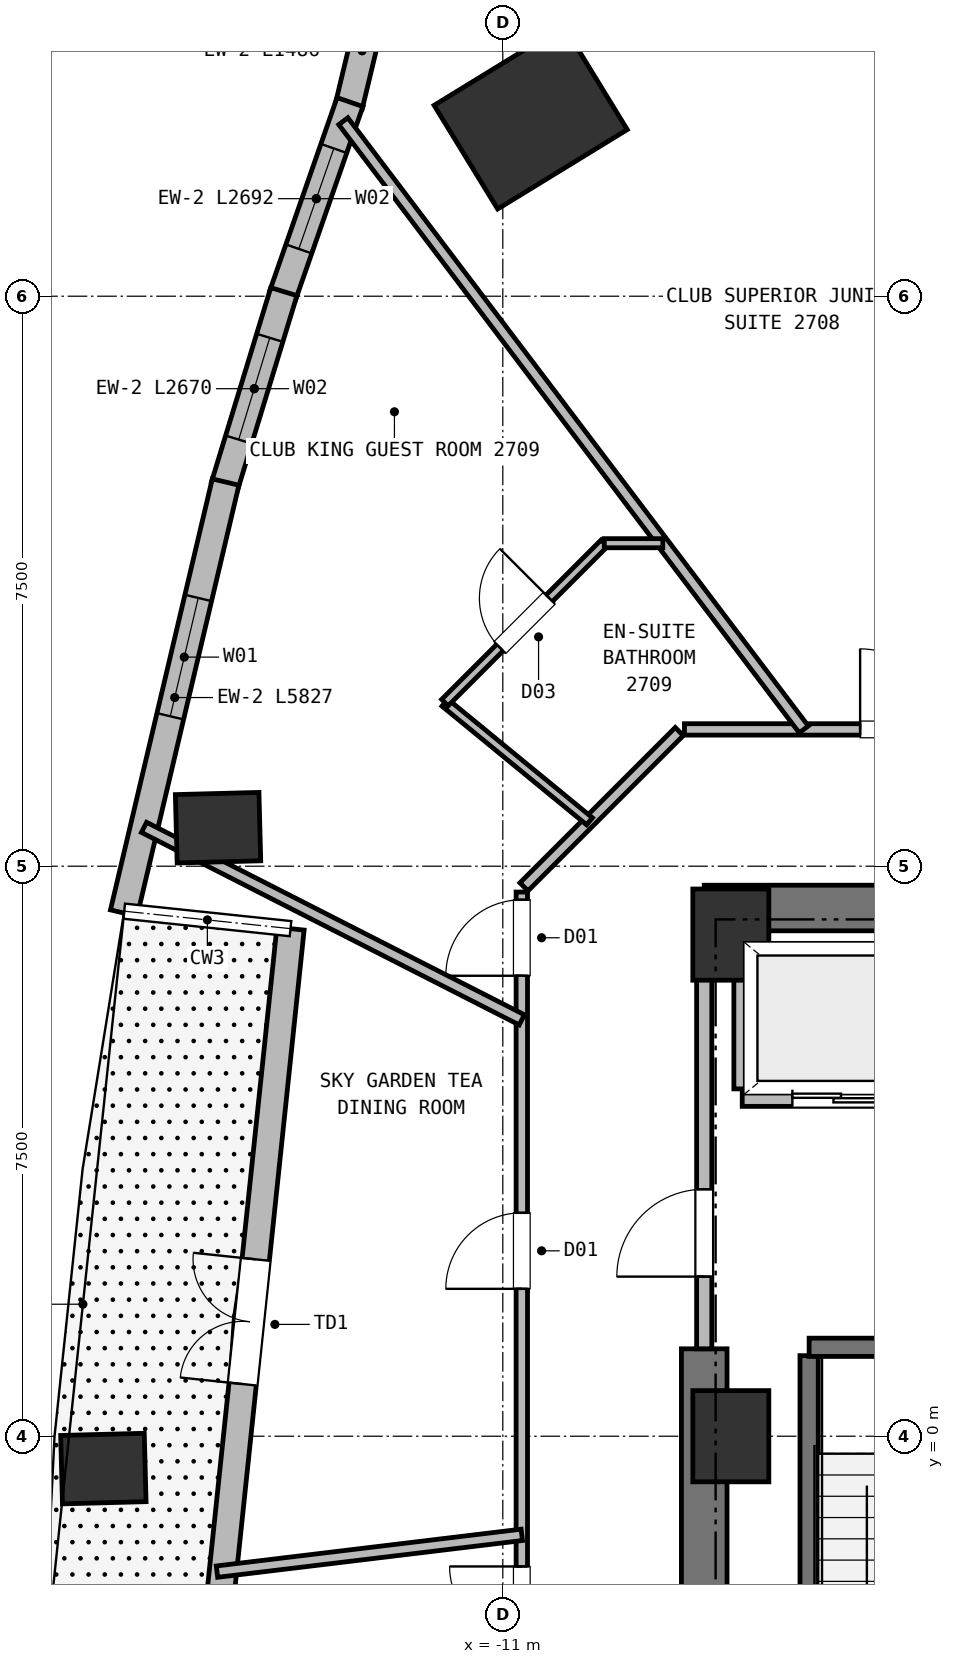
"""IFC4 building model, lengths in metres.
Left out: names, types, materials, properties, quantities, classifications, styles, units other than length and angle.
Written with IfcOpenShell. Run it as: python <this file> out.ifc"""

import sys

from ifc_helpers import new_model, si_unit, direction, frame, frame_2d, origin, origin_2d, place, context, subcontext, project, spatial, rectangle, extrude, element, fill, save


model = new_model("IFC4")
c1 = context("Model", 3, precision=1e-05, world=origin(), true_north=direction((0.0, 1.0)))
c2 = subcontext(c1, "Body", "Model", "MODEL_VIEW")
j1 = project(units=[si_unit("LENGTHUNIT", "METRE"), si_unit("PLANEANGLEUNIT", "RADIAN")], contexts=[c1])
p1 = place(None, origin())
s1 = spatial("IfcSite", under=j1, at=p1, CompositionType="ELEMENT")
p2 = place(p1, origin())
s2 = spatial("IfcBuilding", under=s1, at=p2, CompositionType="ELEMENT")
p3 = place(p2, frame((0.0, 0.0, 101.0)))
s3 = spatial("IfcBuildingStorey", under=s2, at=p3, CompositionType="ELEMENT", Elevation=101.0)
for number, where, z_axis, x_axis in (
    (1, (-8.0, 6.6, 0.0), (0.0, 0.0, 1.0), (1.0, 0.0, 0.0)),
    (2, (-8.0, 0.0, 0.0), (0.0, 0.0, 1.0), (1.0, 0.0, 0.0)),
):
    element("IfcColumn", number, at=place(p3, frame(where, z_axis=z_axis, x_axis=x_axis)), inside=s3, PredefinedType="COLUMN", context=c2, shape_type="SweptSolid", body=[
        extrude(rectangle(XDim=1.0, YDim=1.2, at=origin_2d()), origin(), (0.0, 0.0, 1.0), 3.75),
    ])
p4 = place(p3, frame((-8.35, 6.95, 0.0), z_axis=(0.0, 0.0, 1.0), x_axis=(1.0, 0.0, 0.0)))
e3 = element("IfcWall", 3, at=p4, inside=s3, PredefinedType="SHEAR", context=c2, shape_type="SweptSolid", body=[
    extrude(rectangle(XDim=16.7, YDim=0.6, at=frame_2d((8.35, 0.0))), origin(), (0.0, 0.0, 1.0), 3.5),
])
p5 = place(p3, frame((-8.35, -6.95, 0.0), z_axis=(0.0, 0.0, 1.0), x_axis=(0.0, 1.0, 0.0)))
e4 = element("IfcWall", 4, at=p5, inside=s3, PredefinedType="SHEAR", context=c2, shape_type="SweptSolid", body=[
    extrude(rectangle(XDim=8.1, YDim=0.6, at=frame_2d((4.05, 0.0))), origin(), (0.0, 0.0, 1.0), 3.5),
])
p6 = place(p3, frame((-10.633, 17.352, 0.0), z_axis=(0.0, 0.0, 1.0), x_axis=(-0.522498564716, 0.852640164354, 0.0)))
e5 = element("IfcColumn", 5, at=p6, inside=s3, PredefinedType="COLUMN", context=c2, shape_type="SweptSolid", body=[
    extrude(rectangle(XDim=1.6, YDim=2.0, at=origin_2d()), origin(), (0.0, 0.0, 1.0), 3.75),
])
for number, where, z_axis, x_axis in (
    (6, (-14.747, 8.007, 0.0), (0.0, 0.0, 1.0), (-0.026, 1.0, 0.0)),
    (7, (-16.255, -0.426, 0.0), (0.0, 0.0, 1.0), (-0.026, 1.0, 0.0)),
):
    element("IfcColumn", number, at=place(p3, frame(where, z_axis=z_axis, x_axis=x_axis)), inside=s3, PredefinedType="COLUMN", context=c2, shape_type="SweptSolid", body=[
        extrude(rectangle(XDim=0.9, YDim=1.1, at=origin_2d()), origin(), (0.0, 0.0, 1.0), 3.75),
    ])
p7 = place(p3, frame((-14.88, -3.665, 0.0), z_axis=(0.0, 0.0, 1.0), x_axis=(0.104508820017, 0.994523959761, 0.0)))
e8 = element("IfcWall", 8, at=p7, inside=s3, PredefinedType="SOLIDWALL", context=c2, shape_type="SweptSolid", body=[
    extrude(rectangle(XDim=10.4, YDim=0.36, at=frame_2d((5.2, 0.0))), origin(), (0.0, 0.0, 1.0), 3.5),
])
p8 = place(p7, frame((4.375, 0.0, 0.0)))
e9 = element("IfcOpeningElement", 9, at=p8, cuts=e8, PredefinedType="OPENING", context=c2, shape_type="SweptSolid", body=[
    extrude(rectangle(XDim=1.65, YDim=2.25, at=frame_2d((0.825, 1.125))), frame((0.0, 0.19, 0.0), z_axis=(0.0, -1.0, 0.0), x_axis=(1.0, 0.0, 0.0)), (0.0, 0.0, 1.0), 0.38),
])
p9 = place(p3, frame((-13.025, 17.506, 0.0), z_axis=(0.0, 0.0, 1.0), x_axis=(0.23351590147, 0.972352983109, 0.0)))
e10 = element("IfcWall", 10, at=p9, inside=s3, PredefinedType="SOLIDWALL", context=c2, shape_type="SweptSolid", body=[
    extrude(rectangle(XDim=1.486, YDim=0.36, at=frame_2d((0.743, 0.0))), origin(), (0.0, 0.0, 1.0), 3.5),
])
p10 = place(p3, frame((-13.896, 15.012, 0.0), z_axis=(0.0, 0.0, 1.0), x_axis=(0.328988489893, 0.944333931148, 0.0)))
e11 = element("IfcWall", 11, at=p10, inside=s3, PredefinedType="SOLIDWALL", context=c2, shape_type="SweptSolid", body=[
    extrude(rectangle(XDim=2.692, YDim=0.36, at=frame_2d((1.346, 0.0))), origin(), (0.0, 0.0, 1.0), 3.5),
])
p11 = place(p10, frame((0.646, 0.0, 0.72)))
e12 = element("IfcOpeningElement", 12, at=p11, cuts=e11, PredefinedType="OPENING", context=c2, shape_type="SweptSolid", body=[
    extrude(rectangle(XDim=1.4, YDim=1.84, at=frame_2d((0.7, 0.92))), frame((0.0, 0.19, 0.0), z_axis=(0.0, -1.0, 0.0), x_axis=(1.0, 0.0, 0.0)), (0.0, 0.0, 1.0), 0.38),
])
p12 = place(p3, frame((-14.66, 12.507, 0.0), z_axis=(0.0, 0.0, 1.0), x_axis=(0.291842096338, 0.956466513164, 0.0)))
e13 = element("IfcWall", 13, at=p12, inside=s3, PredefinedType="SOLIDWALL", context=c2, shape_type="SweptSolid", body=[
    extrude(rectangle(XDim=2.669, YDim=0.36, at=frame_2d((1.335, 0.0))), origin(), (0.0, 0.0, 1.0), 3.5),
])
p13 = place(p12, frame((0.635, 0.0, 0.72)))
e14 = element("IfcOpeningElement", 14, at=p13, cuts=e13, PredefinedType="OPENING", context=c2, shape_type="SweptSolid", body=[
    extrude(rectangle(XDim=1.4, YDim=1.84, at=frame_2d((0.7, 0.92))), frame((0.0, 0.19, 0.0), z_axis=(0.0, -1.0, 0.0), x_axis=(1.0, 0.0, 0.0)), (0.0, 0.0, 1.0), 0.38),
])
p14 = place(p3, frame((-15.987, 6.884, 0.0), z_axis=(0.0, 0.0, 1.0), x_axis=(0.229945366281, 0.973203539105, 0.0)))
e15 = element("IfcWall", 15, at=p14, inside=s3, PredefinedType="SOLIDWALL", context=c2, shape_type="SweptSolid", body=[
    extrude(rectangle(XDim=5.827, YDim=0.36, at=frame_2d((2.914, 0.0))), origin(), (0.0, 0.0, 1.0), 3.5),
])
p15 = place(p14, frame((2.66, 0.0, 0.72)))
e16 = element("IfcOpeningElement", 16, at=p15, cuts=e15, PredefinedType="OPENING", context=c2, shape_type="SweptSolid", body=[
    extrude(rectangle(XDim=1.6, YDim=1.88, at=frame_2d((0.8, 0.94))), frame((0.0, 0.19, 0.0), z_axis=(0.0, -1.0, 0.0), x_axis=(1.0, 0.0, 0.0)), (0.0, 0.0, 1.0), 0.38),
])
p16 = place(p3, frame((-6.97, -6.16, 0.0), z_axis=(0.0, 0.0, 1.0), x_axis=(0.0, 1.0, 0.0)))
e17 = element("IfcWall", 17, at=p16, inside=s3, PredefinedType="SHEAR", context=c2, shape_type="SweptSolid", body=[
    extrude(rectangle(XDim=7.22, YDim=0.24, at=frame_2d((3.61, 0.0))), origin(), (0.0, 0.0, 1.0), 3.5),
])
p17 = place(p3, frame((-6.97, 1.17, 0.0), z_axis=(0.0, 0.0, 1.0), x_axis=(1.0, 0.0, 0.0)))
e18 = element("IfcWall", 18, at=p17, inside=s3, PredefinedType="SHEAR", context=c2, shape_type="SweptSolid", body=[
    extrude(rectangle(XDim=2.96, YDim=0.24, at=frame_2d((1.48, 0.0))), origin(), (0.0, 0.0, 1.0), 3.5),
])
p18 = place(p17, frame((0.9, 0.0, 0.0)))
e19 = element("IfcOpeningElement", 19, at=p18, cuts=e18, PredefinedType="OPENING", context=c2, shape_type="SweptSolid", body=[
    extrude(rectangle(XDim=1.15, YDim=2.15, at=frame_2d((0.575, 1.075))), frame((0.0, 0.13, 0.0), z_axis=(0.0, -1.0, 0.0), x_axis=(1.0, 0.0, 0.0)), (0.0, 0.0, 1.0), 0.26),
])
p19 = place(p3, frame((-7.85, 4.45, 0.0), z_axis=(0.0, 0.0, 1.0), x_axis=(1.0, 0.0, 0.0)))
e20 = element("IfcWall", 20, at=p19, inside=s3, PredefinedType="PARTITIONING", context=c2, shape_type="SweptSolid", body=[
    extrude(rectangle(XDim=2.5, YDim=0.22, at=frame_2d((1.25, 0.0))), origin(), (0.0, 0.0, 1.0), 3.5),
])
p20 = place(p19, frame((0.66, 0.0, 0.0)))
e21 = element("IfcOpeningElement", 21, at=p20, cuts=e20, PredefinedType="OPENING", context=c2, shape_type="SweptSolid", body=[
    extrude(rectangle(XDim=1.18, YDim=2.15, at=frame_2d((0.59, 1.075))), frame((0.0, 0.12, 0.0), z_axis=(0.0, -1.0, 0.0), x_axis=(1.0, 0.0, 0.0)), (0.0, 0.0, 1.0), 0.24),
])
p21 = place(p3, frame((-7.85, 4.57, 0.0), z_axis=(0.0, 0.0, 1.0), x_axis=(0.0, 1.0, 0.0)))
e22 = element("IfcWall", 22, at=p21, inside=s3, PredefinedType="PARTITIONING", context=c2, shape_type="SweptSolid", body=[
    extrude(rectangle(XDim=2.08, YDim=0.22, at=frame_2d((1.04, 0.0))), origin(), (0.0, 0.0, 1.0), 3.12),
])
p22 = place(p3, frame((-8.35, 1.15, 0.0), z_axis=(0.0, 0.0, 1.0), x_axis=(0.0, 1.0, 0.0)))
e23 = element("IfcWall", 23, at=p22, inside=s3, PredefinedType="PARTITIONING", context=c2, shape_type="SweptSolid", body=[
    extrude(rectangle(XDim=5.4, YDim=0.2, at=frame_2d((2.7, 0.0))), origin(), (0.0, 0.0, 1.0), 3.5),
])
p23 = place(p22, frame((0.95, 0.0, 0.0)))
e24 = element("IfcOpeningElement", 24, at=p23, cuts=e23, PredefinedType="OPENING", context=c2, shape_type="SweptSolid", body=[
    extrude(rectangle(XDim=1.15, YDim=2.15, at=frame_2d((0.575, 1.075))), frame((0.0, 0.11, 0.0), z_axis=(0.0, -1.0, 0.0), x_axis=(1.0, 0.0, 0.0)), (0.0, 0.0, 1.0), 0.22),
])
p24 = place(p3, frame((-8.61, 9.3, 0.0), z_axis=(0.0, 0.0, 1.0), x_axis=(1.0, 0.0, 0.0)))
e25 = element("IfcWall", 25, at=p24, inside=s3, PredefinedType="PARTITIONING", context=c2, shape_type="SweptSolid", body=[
    extrude(rectangle(XDim=17.22, YDim=0.15, at=frame_2d((8.61, 0.0))), origin(), (0.0, 0.0, 1.0), 3.5),
])
p25 = place(p24, frame((11.167, 0.0, 0.0)))
e26 = element("IfcOpeningElement", 26, at=p25, cuts=e25, PredefinedType="OPENING", context=c2, shape_type="SweptSolid", body=[
    extrude(rectangle(XDim=1.0, YDim=2.15, at=frame_2d((0.5, 1.075))), frame((0.0, 0.085, 0.0), z_axis=(0.0, -1.0, 0.0), x_axis=(1.0, 0.0, 0.0)), (0.0, 0.0, 1.0), 0.17),
])
p26 = place(p24, frame((6.944, 0.0, 0.0)))
e27 = element("IfcOpeningElement", 27, at=p26, cuts=e25, PredefinedType="OPENING", context=c2, shape_type="SweptSolid", body=[
    extrude(rectangle(XDim=1.06, YDim=2.15, at=frame_2d((0.53, 1.075))), frame((0.0, 0.085, 0.0), z_axis=(0.0, -1.0, 0.0), x_axis=(1.0, 0.0, 0.0)), (0.0, 0.0, 1.0), 0.17),
])
p27 = place(p24, frame((2.311, 0.0, 0.0)))
e28 = element("IfcOpeningElement", 28, at=p27, cuts=e25, PredefinedType="OPENING", context=c2, shape_type="SweptSolid", body=[
    extrude(rectangle(XDim=1.06, YDim=2.15, at=frame_2d((0.53, 1.075))), frame((0.0, 0.085, 0.0), z_axis=(0.0, -1.0, 0.0), x_axis=(1.0, 0.0, 0.0)), (0.0, 0.0, 1.0), 0.17),
])
p28 = place(p3, frame((-10.722, 7.228, 0.0), z_axis=(0.0, 0.0, 1.0), x_axis=(0.707106781187, 0.707106781187, 0.0)))
e29 = element("IfcWall", 29, at=p28, inside=s3, PredefinedType="PARTITIONING", context=c2, shape_type="SweptSolid", body=[
    extrude(rectangle(XDim=2.89, YDim=0.15, at=frame_2d((1.445, 0.0))), origin(), (0.0, 0.0, 1.0), 3.5),
])
p29 = place(p3, frame((-10.75, -5.76, 0.0), z_axis=(0.0, 0.0, 1.0), x_axis=(0.0, 1.0, 0.0)))
e30 = element("IfcWall", 30, at=p29, inside=s3, PredefinedType="PARTITIONING", context=c2, shape_type="SweptSolid", body=[
    extrude(rectangle(XDim=12.92, YDim=0.15, at=frame_2d((6.46, 0.0))), origin(), (0.0, 0.0, 1.0), 3.5),
])
p30 = place(p29, frame((3.096, 0.0, 0.0)))
e31 = element("IfcOpeningElement", 31, at=p30, cuts=e30, PredefinedType="OPENING", context=c2, shape_type="SweptSolid", body=[
    extrude(rectangle(XDim=0.95, YDim=2.1, at=frame_2d((0.475, 1.05))), frame((0.0, 0.085, 0.0), z_axis=(0.0, -1.0, 0.0), x_axis=(1.0, 0.0, 0.0)), (0.0, 0.0, 1.0), 0.17),
])
p31 = place(p29, frame((1.118, 0.0, 0.0)))
e32 = element("IfcOpeningElement", 32, at=p31, cuts=e30, PredefinedType="OPENING", context=c2, shape_type="SweptSolid", body=[
    extrude(rectangle(XDim=0.95, YDim=2.1, at=frame_2d((0.475, 1.05))), frame((0.0, 0.085, 0.0), z_axis=(0.0, -1.0, 0.0), x_axis=(1.0, 0.0, 0.0)), (0.0, 0.0, 1.0), 0.17),
])
p32 = place(p29, frame((7.699, 0.0, 0.0)))
e33 = element("IfcOpeningElement", 33, at=p32, cuts=e30, PredefinedType="OPENING", context=c2, shape_type="SweptSolid", body=[
    extrude(rectangle(XDim=1.0, YDim=2.15, at=frame_2d((0.5, 1.075))), frame((0.0, 0.085, 0.0), z_axis=(0.0, -1.0, 0.0), x_axis=(1.0, 0.0, 0.0)), (0.0, 0.0, 1.0), 0.17),
])
p33 = place(p29, frame((11.819, 0.0, 0.0)))
e34 = element("IfcOpeningElement", 34, at=p33, cuts=e30, PredefinedType="OPENING", context=c2, shape_type="SweptSolid", body=[
    extrude(rectangle(XDim=1.0, YDim=2.15, at=frame_2d((0.5, 1.075))), frame((0.0, 0.085, 0.0), z_axis=(0.0, -1.0, 0.0), x_axis=(1.0, 0.0, 0.0)), (0.0, 0.0, 1.0), 0.17),
])
p34 = place(p3, frame((-7.04, 9.3, 0.0), z_axis=(0.0, 0.0, 1.0), x_axis=(-0.60357057416, 0.797309577271, 0.0)))
e35 = element("IfcWall", 35, at=p34, inside=s3, PredefinedType="PARTITIONING", context=c2, shape_type="SweptSolid", body=[
    extrude(rectangle(XDim=10.037, YDim=0.15, at=frame_2d((5.019, 0.0))), origin(), (0.0, 0.0, 1.0), 3.5),
])
p35 = place(p3, frame((-11.762, 9.653, 0.0), z_axis=(0.0, 0.0, 1.0), x_axis=(0.773019750399, -0.634381955523, 0.0)))
e36 = element("IfcWall", 36, at=p35, inside=s3, PredefinedType="PARTITIONING", context=c2, shape_type="SweptSolid", body=[
    extrude(rectangle(XDim=2.462, YDim=0.12, at=frame_2d((1.231, 0.0))), origin(), (0.0, 0.0, 1.0), 3.5),
])
p36 = place(p3, frame((-11.762, 9.653, 0.0), z_axis=(0.0, 0.0, 1.0), x_axis=(0.707106781187, 0.707106781187, 0.0)))
e37 = element("IfcWall", 37, at=p36, inside=s3, PredefinedType="PARTITIONING", context=c2, shape_type="SweptSolid", body=[
    extrude(rectangle(XDim=2.966, YDim=0.12, at=frame_2d((1.483, 0.0))), origin(), (0.0, 0.0, 1.0), 3.5),
])
p37 = place(p36, frame((1.023, 0.0, 0.0)))
e38 = element("IfcOpeningElement", 38, at=p37, cuts=e37, PredefinedType="OPENING", context=c2, shape_type="SweptSolid", body=[
    extrude(rectangle(XDim=0.92, YDim=2.1, at=frame_2d((0.46, 1.05))), frame((0.0, 0.07, 0.0), z_axis=(0.0, -1.0, 0.0), x_axis=(1.0, 0.0, 0.0)), (0.0, 0.0, 1.0), 0.14),
])
p38 = place(p3, frame((-8.895, 11.75, 0.0), z_axis=(0.0, 0.0, 1.0), x_axis=(-1.0, 0.0, 0.0)))
e39 = element("IfcWall", 39, at=p38, inside=s3, PredefinedType="PARTITIONING", context=c2, shape_type="SweptSolid", body=[
    extrude(rectangle(XDim=0.77, YDim=0.12, at=frame_2d((0.385, 0.0))), origin(), (0.0, 0.0, 1.0), 3.5),
])
p39 = place(p3, frame((-10.75, 5.478, 0.0), z_axis=(0.0, 0.0, 1.0), x_axis=(-0.890978705021, 0.454045093796, 0.0)))
e40 = element("IfcWall", 40, at=p39, inside=s3, PredefinedType="PARTITIONING", context=c2, shape_type="SweptSolid", body=[
    extrude(rectangle(XDim=5.579, YDim=0.15, at=frame_2d((2.789, 0.0))), origin(), (0.0, 0.0, 1.0), 3.5),
])
p40 = place(p3, frame((-10.75, -1.298, 0.0), z_axis=(0.0, 0.0, 1.0), x_axis=(-0.992792513818, -0.119845836422, 0.0)))
e41 = element("IfcWall", 41, at=p40, inside=s3, PredefinedType="PARTITIONING", context=c2, shape_type="SweptSolid", body=[
    extrude(rectangle(XDim=4.04, YDim=0.15, at=frame_2d((2.02, 0.0))), origin(), (0.0, 0.0, 1.0), 3.5),
])
p41 = place(p8, origin())
e42 = element("IfcDoor", 42, at=p41, inside=s3, OperationType="DOUBLE_DOOR_SINGLE_SWING", PredefinedType="DOOR", context=c2, shape_type="SweptSolid", body=[
    extrude(rectangle(XDim=1.65, YDim=2.25, at=frame_2d((0.825, 1.125))), frame((0.0, 0.025, 0.0), z_axis=(0.0, -1.0, 0.0), x_axis=(1.0, 0.0, 0.0)), (0.0, 0.0, 1.0), 0.05),
])
fill(e9, e42)
p42 = place(p11, origin())
e43 = element("IfcWindow", 43, at=p42, inside=s3, PartitioningType="SINGLE_PANEL", PredefinedType="WINDOW", context=c2, shape_type="SweptSolid", body=[
    extrude(rectangle(XDim=1.4, YDim=1.84, at=frame_2d((0.7, 0.92))), frame((0.0, 0.03, 0.0), z_axis=(0.0, -1.0, 0.0), x_axis=(1.0, 0.0, 0.0)), (0.0, 0.0, 1.0), 0.06),
])
fill(e12, e43)
p43 = place(p13, origin())
e44 = element("IfcWindow", 44, at=p43, inside=s3, PartitioningType="SINGLE_PANEL", PredefinedType="WINDOW", context=c2, shape_type="SweptSolid", body=[
    extrude(rectangle(XDim=1.4, YDim=1.84, at=frame_2d((0.7, 0.92))), frame((0.0, 0.03, 0.0), z_axis=(0.0, -1.0, 0.0), x_axis=(1.0, 0.0, 0.0)), (0.0, 0.0, 1.0), 0.06),
])
fill(e14, e44)
p44 = place(p15, origin())
e45 = element("IfcWindow", 45, at=p44, inside=s3, PartitioningType="SINGLE_PANEL", PredefinedType="WINDOW", context=c2, shape_type="SweptSolid", body=[
    extrude(rectangle(XDim=1.6, YDim=1.88, at=frame_2d((0.8, 0.94))), frame((0.0, 0.03, 0.0), z_axis=(0.0, -1.0, 0.0), x_axis=(1.0, 0.0, 0.0)), (0.0, 0.0, 1.0), 0.06),
])
fill(e16, e45)
p45 = place(p20, origin())
e46 = element("IfcDoor", 46, at=p45, inside=s3, OperationType="DOUBLE_DOOR_SLIDING", PredefinedType="DOOR", context=c2, shape_type="SweptSolid", body=[
    extrude(rectangle(XDim=1.18, YDim=2.15, at=frame_2d((0.59, 1.075))), frame((0.0, 0.025, 0.0), z_axis=(0.0, -1.0, 0.0), x_axis=(1.0, 0.0, 0.0)), (0.0, 0.0, 1.0), 0.05),
])
fill(e21, e46)
p46 = place(p23, origin())
e47 = element("IfcDoor", 47, at=p46, inside=s3, OperationType="SINGLE_SWING_LEFT", PredefinedType="DOOR", context=c2, shape_type="SweptSolid", body=[
    extrude(rectangle(XDim=1.15, YDim=2.15, at=frame_2d((0.575, 1.075))), frame((0.0, 0.025, 0.0), z_axis=(0.0, -1.0, 0.0), x_axis=(1.0, 0.0, 0.0)), (0.0, 0.0, 1.0), 0.05),
])
fill(e24, e47)
p47 = place(p37, origin())
e48 = element("IfcDoor", 48, at=p47, inside=s3, OperationType="SINGLE_SWING_RIGHT", PredefinedType="DOOR", context=c2, shape_type="SweptSolid", body=[
    extrude(rectangle(XDim=0.92, YDim=2.1, at=frame_2d((0.46, 1.05))), frame((0.0, 0.025, 0.0), z_axis=(0.0, -1.0, 0.0), x_axis=(1.0, 0.0, 0.0)), (0.0, 0.0, 1.0), 0.05),
])
fill(e38, e48)
p48 = place(p30, origin())
e49 = element("IfcDoor", 49, at=p48, inside=s3, OperationType="SINGLE_SWING_RIGHT", PredefinedType="DOOR", context=c2, shape_type="SweptSolid", body=[
    extrude(rectangle(XDim=0.95, YDim=2.1, at=frame_2d((0.475, 1.05))), frame((0.0, 0.025, 0.0), z_axis=(0.0, -1.0, 0.0), x_axis=(1.0, 0.0, 0.0)), (0.0, 0.0, 1.0), 0.05),
])
fill(e31, e49)
p49 = place(p32, origin())
e50 = element("IfcDoor", 50, at=p49, inside=s3, OperationType="SINGLE_SWING_LEFT", PredefinedType="DOOR", context=c2, shape_type="SweptSolid", body=[
    extrude(rectangle(XDim=1.0, YDim=2.15, at=frame_2d((0.5, 1.075))), frame((0.0, 0.025, 0.0), z_axis=(0.0, -1.0, 0.0), x_axis=(1.0, 0.0, 0.0)), (0.0, 0.0, 1.0), 0.05),
])
fill(e33, e50)
p50 = place(p33, origin())
e51 = element("IfcDoor", 51, at=p50, inside=s3, OperationType="SINGLE_SWING_LEFT", PredefinedType="DOOR", context=c2, shape_type="SweptSolid", body=[
    extrude(rectangle(XDim=1.0, YDim=2.15, at=frame_2d((0.5, 1.075))), frame((0.0, 0.025, 0.0), z_axis=(0.0, -1.0, 0.0), x_axis=(1.0, 0.0, 0.0)), (0.0, 0.0, 1.0), 0.05),
])
fill(e34, e51)
p51 = place(p27, origin())
e52 = element("IfcDoor", 52, at=p51, inside=s3, OperationType="SINGLE_SWING_LEFT", PredefinedType="DOOR", context=c2, shape_type="SweptSolid", body=[
    extrude(rectangle(XDim=1.06, YDim=2.15, at=frame_2d((0.53, 1.075))), frame((0.0, 0.025, 0.0), z_axis=(0.0, -1.0, 0.0), x_axis=(1.0, 0.0, 0.0)), (0.0, 0.0, 1.0), 0.05),
])
fill(e28, e52)
save(model, sys.argv[1])
